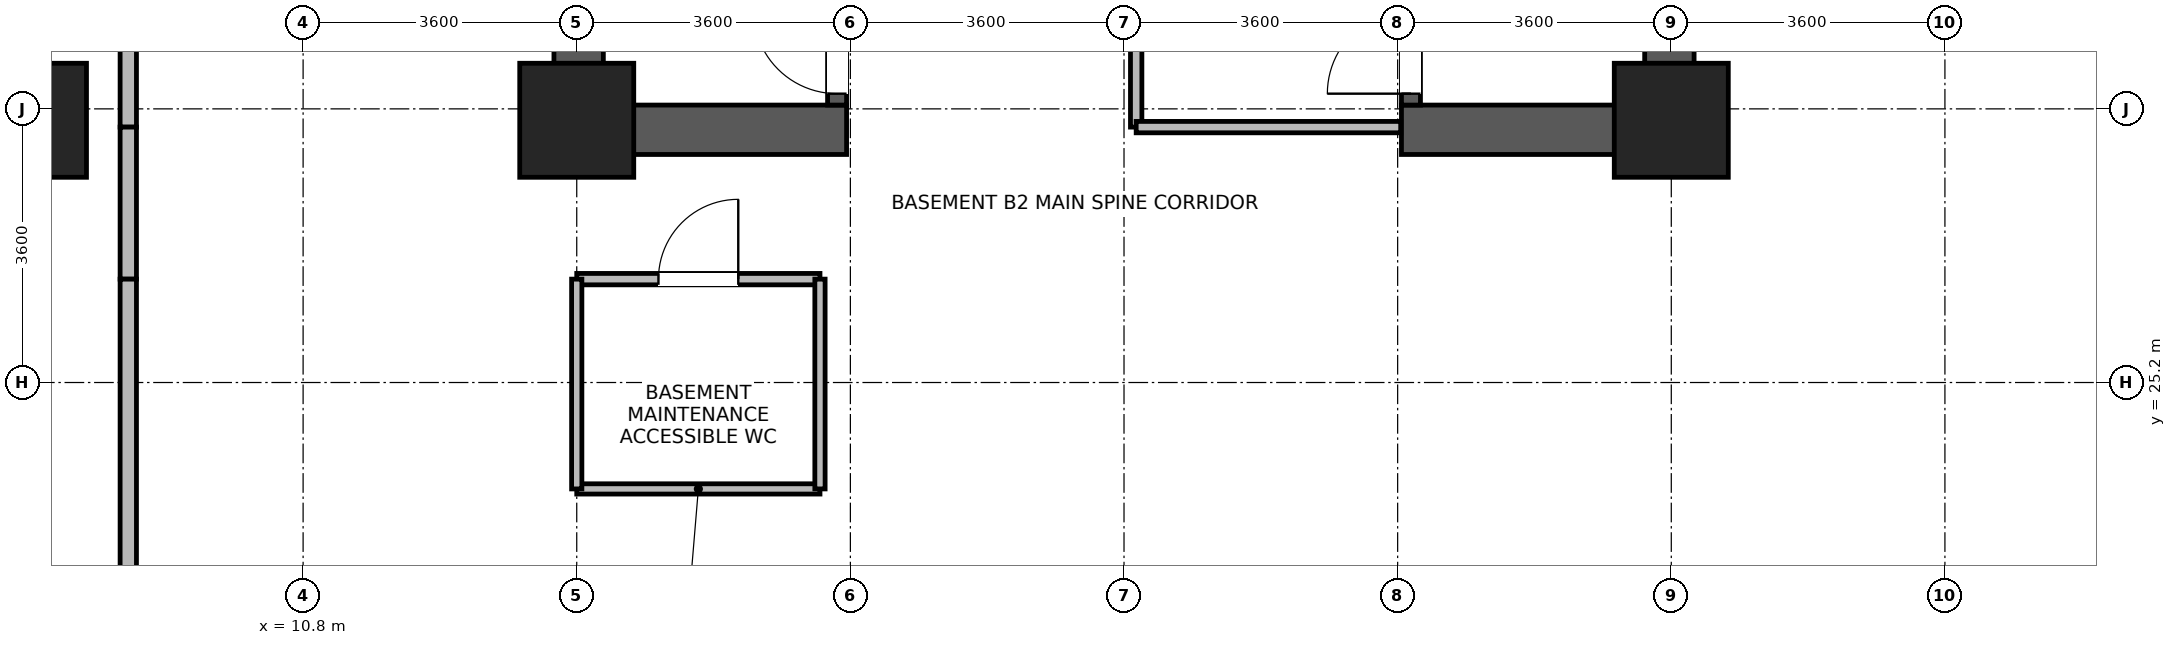
"""IFC4 building model, lengths in metres.
Left out: names, types, materials, properties, quantities, classifications, styles, units other than length and angle.
Written with IfcOpenShell. Run it as: python <this file> out.ifc"""

import sys

from ifc_helpers import new_model, si_unit, direction, frame, frame_2d, origin, origin_2d, place, context, subcontext, project, spatial, rectangle, extrude, source, transform, mapped, element, fill, save


model = new_model("IFC4")
c1 = context("Model", 3, precision=1e-05, world=origin(), true_north=direction((0.0, 1.0)))
c2 = subcontext(c1, "Body", "Model", "MODEL_VIEW")
j1 = project(units=[si_unit("LENGTHUNIT", "METRE"), si_unit("PLANEANGLEUNIT", "RADIAN")], contexts=[c1])
p1 = place(None, origin())
s1 = spatial("IfcSite", under=j1, at=p1, CompositionType="ELEMENT")
p2 = place(p1, origin())
s2 = spatial("IfcBuilding", under=s1, at=p2, CompositionType="ELEMENT")
p3 = place(p2, frame((0.0, 0.0, -9.0)))
s3 = spatial("IfcBuildingStorey", under=s2, at=p3, CompositionType="ELEMENT", Elevation=-9.0)
for number, where, z_axis, x_axis in (
    (1, (14.425, 28.2, 0.0), (0.0, 0.0, 1.0), (0.0, 1.0, 0.0)),
    (2, (28.775, 28.2, 0.0), (0.0, 0.0, 1.0), (0.0, 1.0, 0.0)),
):
    element("IfcWall", number, at=place(p3, frame(where, z_axis=z_axis, x_axis=x_axis)), inside=s3, PredefinedType="SHEAR", context=c2, shape_type="SweptSolid", body=[
        extrude(rectangle(XDim=8.3, YDim=0.65, at=frame_2d((4.15, 0.0))), origin(), (0.0, 0.0, 1.0), 4.18),
    ])
for number, where, z_axis, x_axis in (
    (3, (14.75, 28.525, 0.0), (0.0, 0.0, 1.0), (1.0, 0.0, 0.0)),
    (4, (25.25, 28.525, 0.0), (0.0, 0.0, 1.0), (1.0, 0.0, 0.0)),
):
    element("IfcWall", number, at=place(p3, frame(where, z_axis=z_axis, x_axis=x_axis)), inside=s3, PredefinedType="SHEAR", context=c2, shape_type="SweptSolid", body=[
        extrude(rectangle(XDim=3.2, YDim=0.65, at=frame_2d((1.6, 0.0))), origin(), (0.0, 0.0, 1.0), 4.18),
    ])
p4 = place(p3, frame((17.825, 28.85, 0.0), z_axis=(0.0, 0.0, 1.0), x_axis=(0.0, 1.0, 0.0)))
e5 = element("IfcWall", 5, at=p4, inside=s3, PredefinedType="SHEAR", context=c2, shape_type="SweptSolid", body=[
    extrude(rectangle(XDim=7.0, YDim=0.25, at=frame_2d((3.5, 0.0))), origin(), (0.0, 0.0, 1.0), 4.18),
])
p5 = place(p4, frame((0.15, 0.0, 0.0)))
e6 = element("IfcOpeningElement", 6, at=p5, cuts=e5, PredefinedType="OPENING", context=c2, shape_type="SweptSolid", body=[
    extrude(rectangle(XDim=1.1, YDim=2.08, at=frame_2d((0.55, 1.04))), frame((0.0, 0.135, 0.0), z_axis=(0.0, -1.0, 0.0), x_axis=(1.0, 0.0, 0.0)), (0.0, 0.0, 1.0), 0.27),
])
p6 = place(p3, frame((25.375, 28.85, 0.0), z_axis=(0.0, 0.0, 1.0), x_axis=(0.0, 1.0, 0.0)))
e7 = element("IfcWall", 7, at=p6, inside=s3, PredefinedType="SHEAR", context=c2, shape_type="SweptSolid", body=[
    extrude(rectangle(XDim=7.0, YDim=0.25, at=frame_2d((3.5, 0.0))), origin(), (0.0, 0.0, 1.0), 4.18),
])
p7 = place(p6, frame((0.15, 0.0, 0.0)))
e8 = element("IfcOpeningElement", 8, at=p7, cuts=e7, PredefinedType="OPENING", context=c2, shape_type="SweptSolid", body=[
    extrude(rectangle(XDim=1.1, YDim=2.08, at=frame_2d((0.55, 1.04))), frame((0.0, 0.135, 0.0), z_axis=(0.0, -1.0, 0.0), x_axis=(1.0, 0.0, 0.0)), (0.0, 0.0, 1.0), 0.27),
])
m1 = source(origin(), c2, "Body", "SweptSolid", [
    extrude(rectangle(XDim=1.5, YDim=1.5, at=origin_2d()), origin(), (0.0, 0.0, 1.0), 4.5),
])
for number, where, z_axis, x_axis in (
    (9, (7.2, 28.65, 0.0), (0.0, 0.0, 1.0), (1.0, 0.0, 0.0)),
    (10, (14.4, 28.65, 0.0), (0.0, 0.0, 1.0), (1.0, 0.0, 0.0)),
    (11, (28.8, 28.65, 0.0), (0.0, 0.0, 1.0), (1.0, 0.0, 0.0)),
):
    element("IfcColumn", number, at=place(p3, frame(where, z_axis=z_axis, x_axis=x_axis)), inside=s3, PredefinedType="COLUMN", context=c2, shape_type="MappedRepresentation", body=[
        mapped(m1, transform((0.0, 0.0, 0.0), x_axis=(1.0, 0.0, 0.0), y_axis=(0.0, 1.0, 0.0), z_axis=(0.0, 0.0, 1.0), scale=1.0)),
    ])
p8 = place(p3, frame((8.5, 28.56, 0.0), z_axis=(0.0, 0.0, 1.0), x_axis=(0.0, 1.0, 0.0)))
e12 = element("IfcWall", 12, at=p8, inside=s3, PredefinedType="PARTITIONING", context=c2, shape_type="SweptSolid", body=[
    extrude(rectangle(XDim=7.68, YDim=0.215, at=frame_2d((3.84, 0.0))), origin(), (0.0, 0.0, 1.0), 4.16),
])
p9 = place(p3, frame((14.4, 26.56, 0.0), z_axis=(0.0, 0.0, 1.0), x_axis=(1.0, 0.0, 0.0)))
e13 = element("IfcWall", 13, at=p9, inside=s3, PredefinedType="PARTITIONING", context=c2, shape_type="SweptSolid", body=[
    extrude(rectangle(XDim=3.2, YDim=0.15, at=frame_2d((1.6, 0.0))), origin(), (0.0, 0.0, 1.0), 4.16),
])
p10 = place(p9, frame((1.075, 0.0, 0.0)))
e14 = element("IfcOpeningElement", 14, at=p10, cuts=e13, PredefinedType="OPENING", context=c2, shape_type="SweptSolid", body=[
    extrude(rectangle(XDim=1.05, YDim=2.12, at=frame_2d((0.525, 1.06))), frame((0.0, 0.085, 0.0), z_axis=(0.0, -1.0, 0.0), x_axis=(1.0, 0.0, 0.0)), (0.0, 0.0, 1.0), 0.17),
])
p11 = place(p3, frame((8.5, 26.56, 0.0), z_axis=(0.0, 0.0, 1.0), x_axis=(0.0, 1.0, 0.0)))
e15 = element("IfcWall", 15, at=p11, inside=s3, PredefinedType="PARTITIONING", context=c2, shape_type="SweptSolid", body=[
    extrude(rectangle(XDim=2.0, YDim=0.215, at=frame_2d((1.0, 0.0))), origin(), (0.0, 0.0, 1.0), 4.16),
])
p12 = place(p3, frame((8.5, 1.8, 0.0), z_axis=(0.0, 0.0, 1.0), x_axis=(0.0, 1.0, 0.0)))
e16 = element("IfcWall", 16, at=p12, inside=s3, PredefinedType="PARTITIONING", context=c2, shape_type="SweptSolid", body=[
    extrude(rectangle(XDim=24.76, YDim=0.215, at=frame_2d((12.38, 0.0))), origin(), (0.0, 0.0, 1.0), 4.16),
])
p13 = place(p3, frame((21.76, 28.56, 0.0), z_axis=(0.0, 0.0, 1.0), x_axis=(0.0, 1.0, 0.0)))
e17 = element("IfcWall", 17, at=p13, inside=s3, PredefinedType="PARTITIONING", context=c2, shape_type="SweptSolid", body=[
    extrude(rectangle(XDim=4.6, YDim=0.15, at=frame_2d((2.3, 0.0))), origin(), (0.0, 0.0, 1.0), 4.16),
])
p14 = place(p13, frame((1.55, 0.0, 0.0)))
e18 = element("IfcOpeningElement", 18, at=p14, cuts=e17, PredefinedType="OPENING", context=c2, shape_type="SweptSolid", body=[
    extrude(rectangle(XDim=1.5, YDim=2.1, at=frame_2d((0.75, 1.05))), frame((0.0, 0.085, 0.0), z_axis=(0.0, -1.0, 0.0), x_axis=(1.0, 0.0, 0.0)), (0.0, 0.0, 1.0), 0.17),
])
p15 = place(p3, frame((21.76, 28.56, 0.0), z_axis=(0.0, 0.0, 1.0), x_axis=(1.0, 0.0, 0.0)))
e19 = element("IfcWall", 19, at=p15, inside=s3, PredefinedType="PARTITIONING", context=c2, shape_type="SweptSolid", body=[
    extrude(rectangle(XDim=3.48, YDim=0.15, at=frame_2d((1.74, 0.0))), origin(), (0.0, 0.0, 1.0), 2.96),
])
p16 = place(p3, frame((14.4, 23.8, 0.0), z_axis=(0.0, 0.0, 1.0), x_axis=(1.0, 0.0, 0.0)))
e20 = element("IfcWall", 20, at=p16, inside=s3, PredefinedType="PARTITIONING", context=c2, shape_type="SweptSolid", body=[
    extrude(rectangle(XDim=3.2, YDim=0.135, at=frame_2d((1.6, 0.0))), origin(), (0.0, 0.0, 1.0), 4.16),
])
p17 = place(p3, frame((14.4, 23.8, 0.0), z_axis=(0.0, 0.0, 1.0), x_axis=(0.0, 1.0, 0.0)))
e21 = element("IfcWall", 21, at=p17, inside=s3, PredefinedType="PARTITIONING", context=c2, shape_type="SweptSolid", body=[
    extrude(rectangle(XDim=2.76, YDim=0.135, at=frame_2d((1.38, 0.0))), origin(), (0.0, 0.0, 1.0), 3.56),
])
p18 = place(p3, frame((17.6, 23.8, 0.0), z_axis=(0.0, 0.0, 1.0), x_axis=(0.0, 1.0, 0.0)))
e22 = element("IfcWall", 22, at=p18, inside=s3, PredefinedType="PARTITIONING", context=c2, shape_type="SweptSolid", body=[
    extrude(rectangle(XDim=2.76, YDim=0.135, at=frame_2d((1.38, 0.0))), origin(), (0.0, 0.0, 1.0), 4.16),
])
p19 = place(p5, origin())
e23 = element("IfcDoor", 23, at=p19, inside=s3, OperationType="SINGLE_SWING_RIGHT", PredefinedType="DOOR", context=c2, shape_type="SweptSolid", body=[
    extrude(rectangle(XDim=1.1, YDim=2.08, at=frame_2d((0.55, 1.04))), frame((0.0, 0.025, 0.0), z_axis=(0.0, -1.0, 0.0), x_axis=(1.0, 0.0, 0.0)), (0.0, 0.0, 1.0), 0.05),
])
fill(e6, e23)
p20 = place(p7, origin())
e24 = element("IfcDoor", 24, at=p20, inside=s3, OperationType="SINGLE_SWING_LEFT", PredefinedType="DOOR", context=c2, shape_type="SweptSolid", body=[
    extrude(rectangle(XDim=1.1, YDim=2.08, at=frame_2d((0.55, 1.04))), frame((0.0, 0.025, 0.0), z_axis=(0.0, -1.0, 0.0), x_axis=(1.0, 0.0, 0.0)), (0.0, 0.0, 1.0), 0.05),
])
fill(e8, e24)
p21 = place(p10, origin())
e25 = element("IfcDoor", 25, at=p21, inside=s3, OperationType="SINGLE_SWING_RIGHT", PredefinedType="DOOR", context=c2, shape_type="SweptSolid", body=[
    extrude(rectangle(XDim=1.05, YDim=2.12, at=frame_2d((0.525, 1.06))), frame((0.0, 0.025, 0.0), z_axis=(0.0, -1.0, 0.0), x_axis=(1.0, 0.0, 0.0)), (0.0, 0.0, 1.0), 0.05),
])
fill(e14, e25)
save(model, sys.argv[1])
